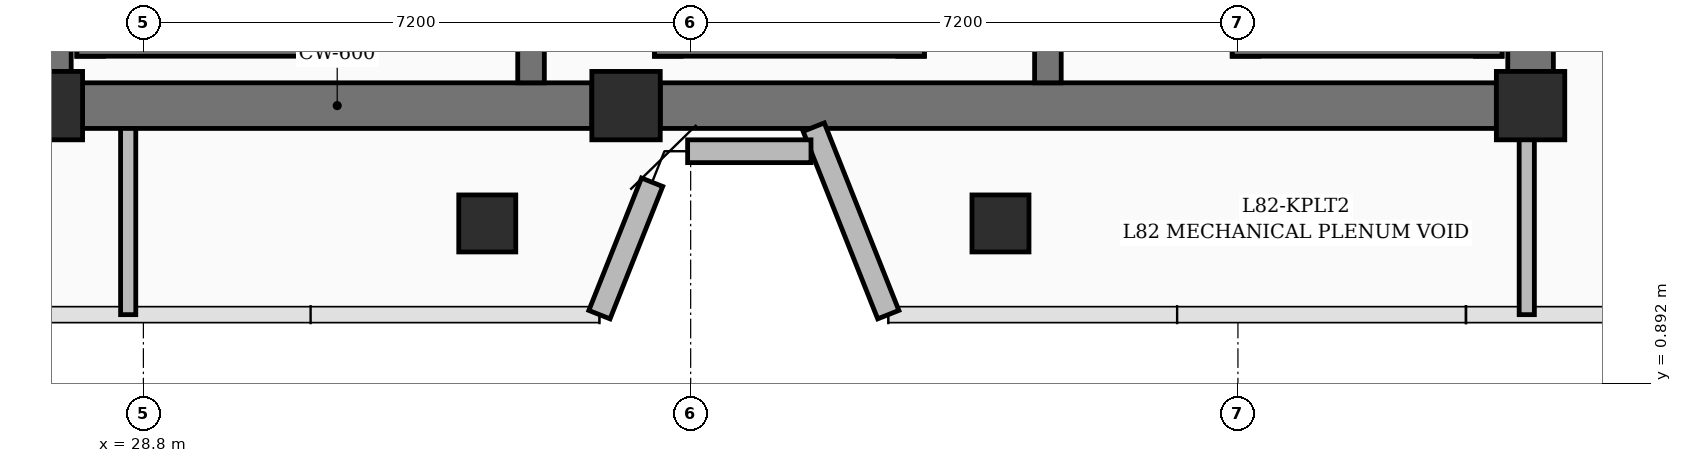
"""IFC4 building model, lengths in metres.
Left out: names, types, materials, properties, quantities, classifications, styles, units other than length and angle.
Written with IfcOpenShell. Run it as: python <this file> out.ifc"""

import sys

from ifc_helpers import new_model, si_unit, direction, frame, frame_2d, origin, origin_2d, place, context, subcontext, project, spatial, rectangle, extrude, element, save


model = new_model("IFC4")
c1 = context("Model", 3, precision=1e-05, world=origin(), true_north=direction((0.0, 1.0)))
c2 = subcontext(c1, "Body", "Model", "MODEL_VIEW")
j1 = project(units=[si_unit("LENGTHUNIT", "METRE"), si_unit("PLANEANGLEUNIT", "RADIAN")], contexts=[c1])
p1 = place(None, origin())
s1 = spatial("IfcSite", under=j1, at=p1, CompositionType="ELEMENT")
p2 = place(p1, origin())
s2 = spatial("IfcBuilding", under=s1, at=p2, CompositionType="ELEMENT")
p3 = place(p2, frame((0.0, 0.0, 318.5)))
s3 = spatial("IfcBuildingStorey", under=s2, at=p3, CompositionType="ELEMENT", Elevation=318.5)
for number, where, z_axis, x_axis in (
    (1, (27.55, 4.55, 0.0), (0.0, 0.0, 1.0), (1.0, 0.0, 0.0)),
    (2, (35.15, 4.55, 0.0), (0.0, 0.0, 1.0), (1.0, 0.0, 0.0)),
    (3, (47.05, 4.55, 0.0), (0.0, 0.0, 1.0), (1.0, 0.0, 0.0)),
):
    element("IfcColumn", number, at=place(p3, frame(where, z_axis=z_axis, x_axis=x_axis)), inside=s3, PredefinedType="COLUMN", context=c2, shape_type="SweptSolid", body=[
        extrude(rectangle(XDim=0.9, YDim=0.9, at=origin_2d()), origin(), (0.0, 0.0, 1.0), 3.4),
    ])
p4 = place(p3, frame((28.0, 4.55, 0.0), z_axis=(0.0, 0.0, 1.0), x_axis=(1.0, 0.0, 0.0)))
e4 = element("IfcWall", 4, at=p4, inside=s3, PredefinedType="SHEAR", context=c2, shape_type="SweptSolid", body=[
    extrude(rectangle(XDim=6.7, YDim=0.6, at=frame_2d((3.35, 0.0))), origin(), (0.0, 0.0, 1.0), 3.4),
])
p5 = place(p3, frame((35.6, 4.55, 0.0), z_axis=(0.0, 0.0, 1.0), x_axis=(1.0, 0.0, 0.0)))
e5 = element("IfcWall", 5, at=p5, inside=s3, PredefinedType="SHEAR", context=c2, shape_type="SweptSolid", body=[
    extrude(rectangle(XDim=11.0, YDim=0.6, at=frame_2d((5.5, 0.0))), origin(), (0.0, 0.0, 1.0), 3.4),
])
for number, where, z_axis, x_axis in (
    (6, (27.55, 5.0, 0.0), (0.0, 0.0, 1.0), (0.0, 1.0, 0.0)),
    (7, (47.05, 5.0, 0.0), (0.0, 0.0, 1.0), (0.0, 1.0, 0.0)),
):
    element("IfcWall", number, at=place(p3, frame(where, z_axis=z_axis, x_axis=x_axis)), inside=s3, PredefinedType="SHEAR", context=c2, shape_type="SweptSolid", body=[
        extrude(rectangle(XDim=9.3, YDim=0.6, at=frame_2d((4.65, 0.0))), origin(), (0.0, 0.0, 1.0), 3.4),
    ])
p6 = place(p3, frame((28.1, 5.2, 0.0), z_axis=(0.0, 0.0, 1.0), x_axis=(0.0, 1.0, 0.0)))
e8 = element("IfcWall", 8, at=p6, inside=s3, PredefinedType="SOLIDWALL", context=c2, shape_type="SweptSolid", body=[
    extrude(rectangle(XDim=9.25, YDim=0.35, at=frame_2d((4.625, 0.0))), origin(), (0.0, 0.0, 1.0), 3.4),
])
p7 = place(p3, frame((31.3, 5.2, 0.0), z_axis=(0.0, 0.0, 1.0), x_axis=(0.0, 1.0, 0.0)))
e9 = element("IfcWall", 9, at=p7, inside=s3, PredefinedType="SOLIDWALL", context=c2, shape_type="SweptSolid", body=[
    extrude(rectangle(XDim=9.25, YDim=0.35, at=frame_2d((4.625, 0.0))), origin(), (0.0, 0.0, 1.0), 3.4),
])
p8 = place(p7, frame((6.95, 0.0, 0.0)))
e10 = element("IfcOpeningElement", 10, at=p8, cuts=e9, PredefinedType="OPENING", context=c2, shape_type="SweptSolid", body=[
    extrude(rectangle(XDim=1.0, YDim=2.15, at=frame_2d((0.5, 1.075))), frame((0.0, 0.185, 0.0), z_axis=(0.0, -1.0, 0.0), x_axis=(1.0, 0.0, 0.0)), (0.0, 0.0, 1.0), 0.37),
])
p9 = place(p3, frame((27.925, 5.375, 0.0), z_axis=(0.0, 0.0, 1.0), x_axis=(1.0, 0.0, 0.0)))
e11 = element("IfcWall", 11, at=p9, inside=s3, PredefinedType="SOLIDWALL", context=c2, shape_type="SweptSolid", body=[
    extrude(rectangle(XDim=3.55, YDim=0.35, at=frame_2d((1.775, 0.0))), origin(), (0.0, 0.0, 1.0), 3.4),
])
p10 = place(p3, frame((35.7, 5.2, 0.0), z_axis=(0.0, 0.0, 1.0), x_axis=(0.0, 1.0, 0.0)))
e12 = element("IfcWall", 12, at=p10, inside=s3, PredefinedType="SOLIDWALL", context=c2, shape_type="SweptSolid", body=[
    extrude(rectangle(XDim=9.25, YDim=0.35, at=frame_2d((4.625, 0.0))), origin(), (0.0, 0.0, 1.0), 3.4),
])
p11 = place(p10, frame((6.95, 0.0, 0.0)))
e13 = element("IfcOpeningElement", 13, at=p11, cuts=e12, PredefinedType="OPENING", context=c2, shape_type="SweptSolid", body=[
    extrude(rectangle(XDim=1.0, YDim=2.15, at=frame_2d((0.5, 1.075))), frame((0.0, 0.185, 0.0), z_axis=(0.0, -1.0, 0.0), x_axis=(1.0, 0.0, 0.0)), (0.0, 0.0, 1.0), 0.37),
])
p12 = place(p3, frame((38.9, 5.2, 0.0), z_axis=(0.0, 0.0, 1.0), x_axis=(0.0, 1.0, 0.0)))
e14 = element("IfcWall", 14, at=p12, inside=s3, PredefinedType="SOLIDWALL", context=c2, shape_type="SweptSolid", body=[
    extrude(rectangle(XDim=9.25, YDim=0.35, at=frame_2d((4.625, 0.0))), origin(), (0.0, 0.0, 1.0), 3.4),
])
p13 = place(p12, frame((6.95, 0.0, 0.0)))
e15 = element("IfcOpeningElement", 15, at=p13, cuts=e14, PredefinedType="OPENING", context=c2, shape_type="SweptSolid", body=[
    extrude(rectangle(XDim=1.0, YDim=2.15, at=frame_2d((0.5, 1.075))), frame((0.0, 0.185, 0.0), z_axis=(0.0, -1.0, 0.0), x_axis=(1.0, 0.0, 0.0)), (0.0, 0.0, 1.0), 0.37),
])
p14 = place(p3, frame((35.525, 5.375, 0.0), z_axis=(0.0, 0.0, 1.0), x_axis=(1.0, 0.0, 0.0)))
e16 = element("IfcWall", 16, at=p14, inside=s3, PredefinedType="SOLIDWALL", context=c2, shape_type="SweptSolid", body=[
    extrude(rectangle(XDim=3.55, YDim=0.35, at=frame_2d((1.775, 0.0))), origin(), (0.0, 0.0, 1.0), 3.4),
])
p15 = place(p3, frame((43.3, 5.2, 0.0), z_axis=(0.0, 0.0, 1.0), x_axis=(0.0, 1.0, 0.0)))
e17 = element("IfcWall", 17, at=p15, inside=s3, PredefinedType="SOLIDWALL", context=c2, shape_type="SweptSolid", body=[
    extrude(rectangle(XDim=9.25, YDim=0.35, at=frame_2d((4.625, 0.0))), origin(), (0.0, 0.0, 1.0), 3.4),
])
p16 = place(p15, frame((6.95, 0.0, 0.0)))
e18 = element("IfcOpeningElement", 18, at=p16, cuts=e17, PredefinedType="OPENING", context=c2, shape_type="SweptSolid", body=[
    extrude(rectangle(XDim=1.0, YDim=2.15, at=frame_2d((0.5, 1.075))), frame((0.0, 0.185, 0.0), z_axis=(0.0, -1.0, 0.0), x_axis=(1.0, 0.0, 0.0)), (0.0, 0.0, 1.0), 0.37),
])
p17 = place(p3, frame((46.5, 5.2, 0.0), z_axis=(0.0, 0.0, 1.0), x_axis=(0.0, 1.0, 0.0)))
e19 = element("IfcWall", 19, at=p17, inside=s3, PredefinedType="SOLIDWALL", context=c2, shape_type="SweptSolid", body=[
    extrude(rectangle(XDim=9.25, YDim=0.35, at=frame_2d((4.625, 0.0))), origin(), (0.0, 0.0, 1.0), 3.4),
])
p18 = place(p3, frame((43.125, 5.375, 0.0), z_axis=(0.0, 0.0, 1.0), x_axis=(1.0, 0.0, 0.0)))
e20 = element("IfcWall", 20, at=p18, inside=s3, PredefinedType="SOLIDWALL", context=c2, shape_type="SweptSolid", body=[
    extrude(rectangle(XDim=3.55, YDim=0.35, at=frame_2d((1.775, 0.0))), origin(), (0.0, 0.0, 1.0), 3.4),
])
for number, where, z_axis, x_axis in (
    (21, (33.9, 4.85, 0.0), (0.0, 0.0, 1.0), (0.0, 1.0, 0.0)),
    (22, (40.7, 4.85, 0.0), (0.0, 0.0, 1.0), (0.0, 1.0, 0.0)),
):
    element("IfcWall", number, at=place(p3, frame(where, z_axis=z_axis, x_axis=x_axis)), inside=s3, PredefinedType="SOLIDWALL", context=c2, shape_type="SweptSolid", body=[
        extrude(rectangle(XDim=3.075, YDim=0.35, at=frame_2d((1.538, 0.0))), origin(), (0.0, 0.0, 1.0), 3.4),
    ])
for number, where, z_axis, x_axis in (
    (23, (33.324, 3.0, 0.0), (0.0, 0.0, 1.0), (1.0, 0.0, 0.0)),
    (24, (40.076, 3.0, 0.0), (0.0, 0.0, 1.0), (1.0, 0.0, 0.0)),
):
    element("IfcColumn", number, at=place(p3, frame(where, z_axis=z_axis, x_axis=x_axis)), inside=s3, PredefinedType="COLUMN", context=c2, shape_type="SweptSolid", body=[
        extrude(rectangle(XDim=0.75, YDim=0.75, at=origin_2d()), origin(), (0.0, 0.0, 1.0), 3.4),
    ])
p19 = place(p3, frame((38.6, 1.8, 0.0), z_axis=(0.0, 0.0, 1.0), x_axis=(-0.369518892364, 0.929223217632, 0.0)))
e25 = element("IfcWall", 25, at=p19, inside=s3, PredefinedType="SOLIDWALL", context=c2, shape_type="SweptSolid", body=[
    extrude(rectangle(XDim=2.655, YDim=0.3, at=frame_2d((1.327, 0.0))), origin(), (0.0, 0.0, 1.0), 3.4),
])
p20 = place(p3, frame((37.583, 3.95, 0.0), z_axis=(0.0, 0.0, 1.0), x_axis=(-1.0, 0.0, 0.0)))
e26 = element("IfcWall", 26, at=p20, inside=s3, PredefinedType="SOLIDWALL", context=c2, shape_type="SweptSolid", body=[
    extrude(rectangle(XDim=1.623, YDim=0.3, at=frame_2d((0.812, 0.0))), origin(), (0.0, 0.0, 1.0), 3.4),
])
p21 = place(p3, frame((35.493, 3.542, 0.0), z_axis=(0.0, 0.0, 1.0), x_axis=(-0.36952597164, -0.929220402425, 0.0)))
e27 = element("IfcWall", 27, at=p21, inside=s3, PredefinedType="SOLIDWALL", context=c2, shape_type="SweptSolid", body=[
    extrude(rectangle(XDim=1.874, YDim=0.3, at=frame_2d((0.937, 0.0))), origin(), (0.0, 0.0, 1.0), 3.4),
])
for number, where, z_axis, x_axis in (
    (28, (28.6, 4.25, 0.0), (0.0, 0.0, 1.0), (0.0, -1.0, 0.0)),
    (29, (47.0, 1.8, 0.0), (0.0, 0.0, 1.0), (0.0, 1.0, 0.0)),
):
    element("IfcWall", number, at=place(p3, frame(where, z_axis=z_axis, x_axis=x_axis)), inside=s3, PredefinedType="PARTITIONING", context=c2, shape_type="SweptSolid", body=[
        extrude(rectangle(XDim=2.45, YDim=0.2, at=frame_2d((1.225, 0.0))), origin(), (0.0, 0.0, 1.0), 3.68),
    ])
save(model, sys.argv[1])
